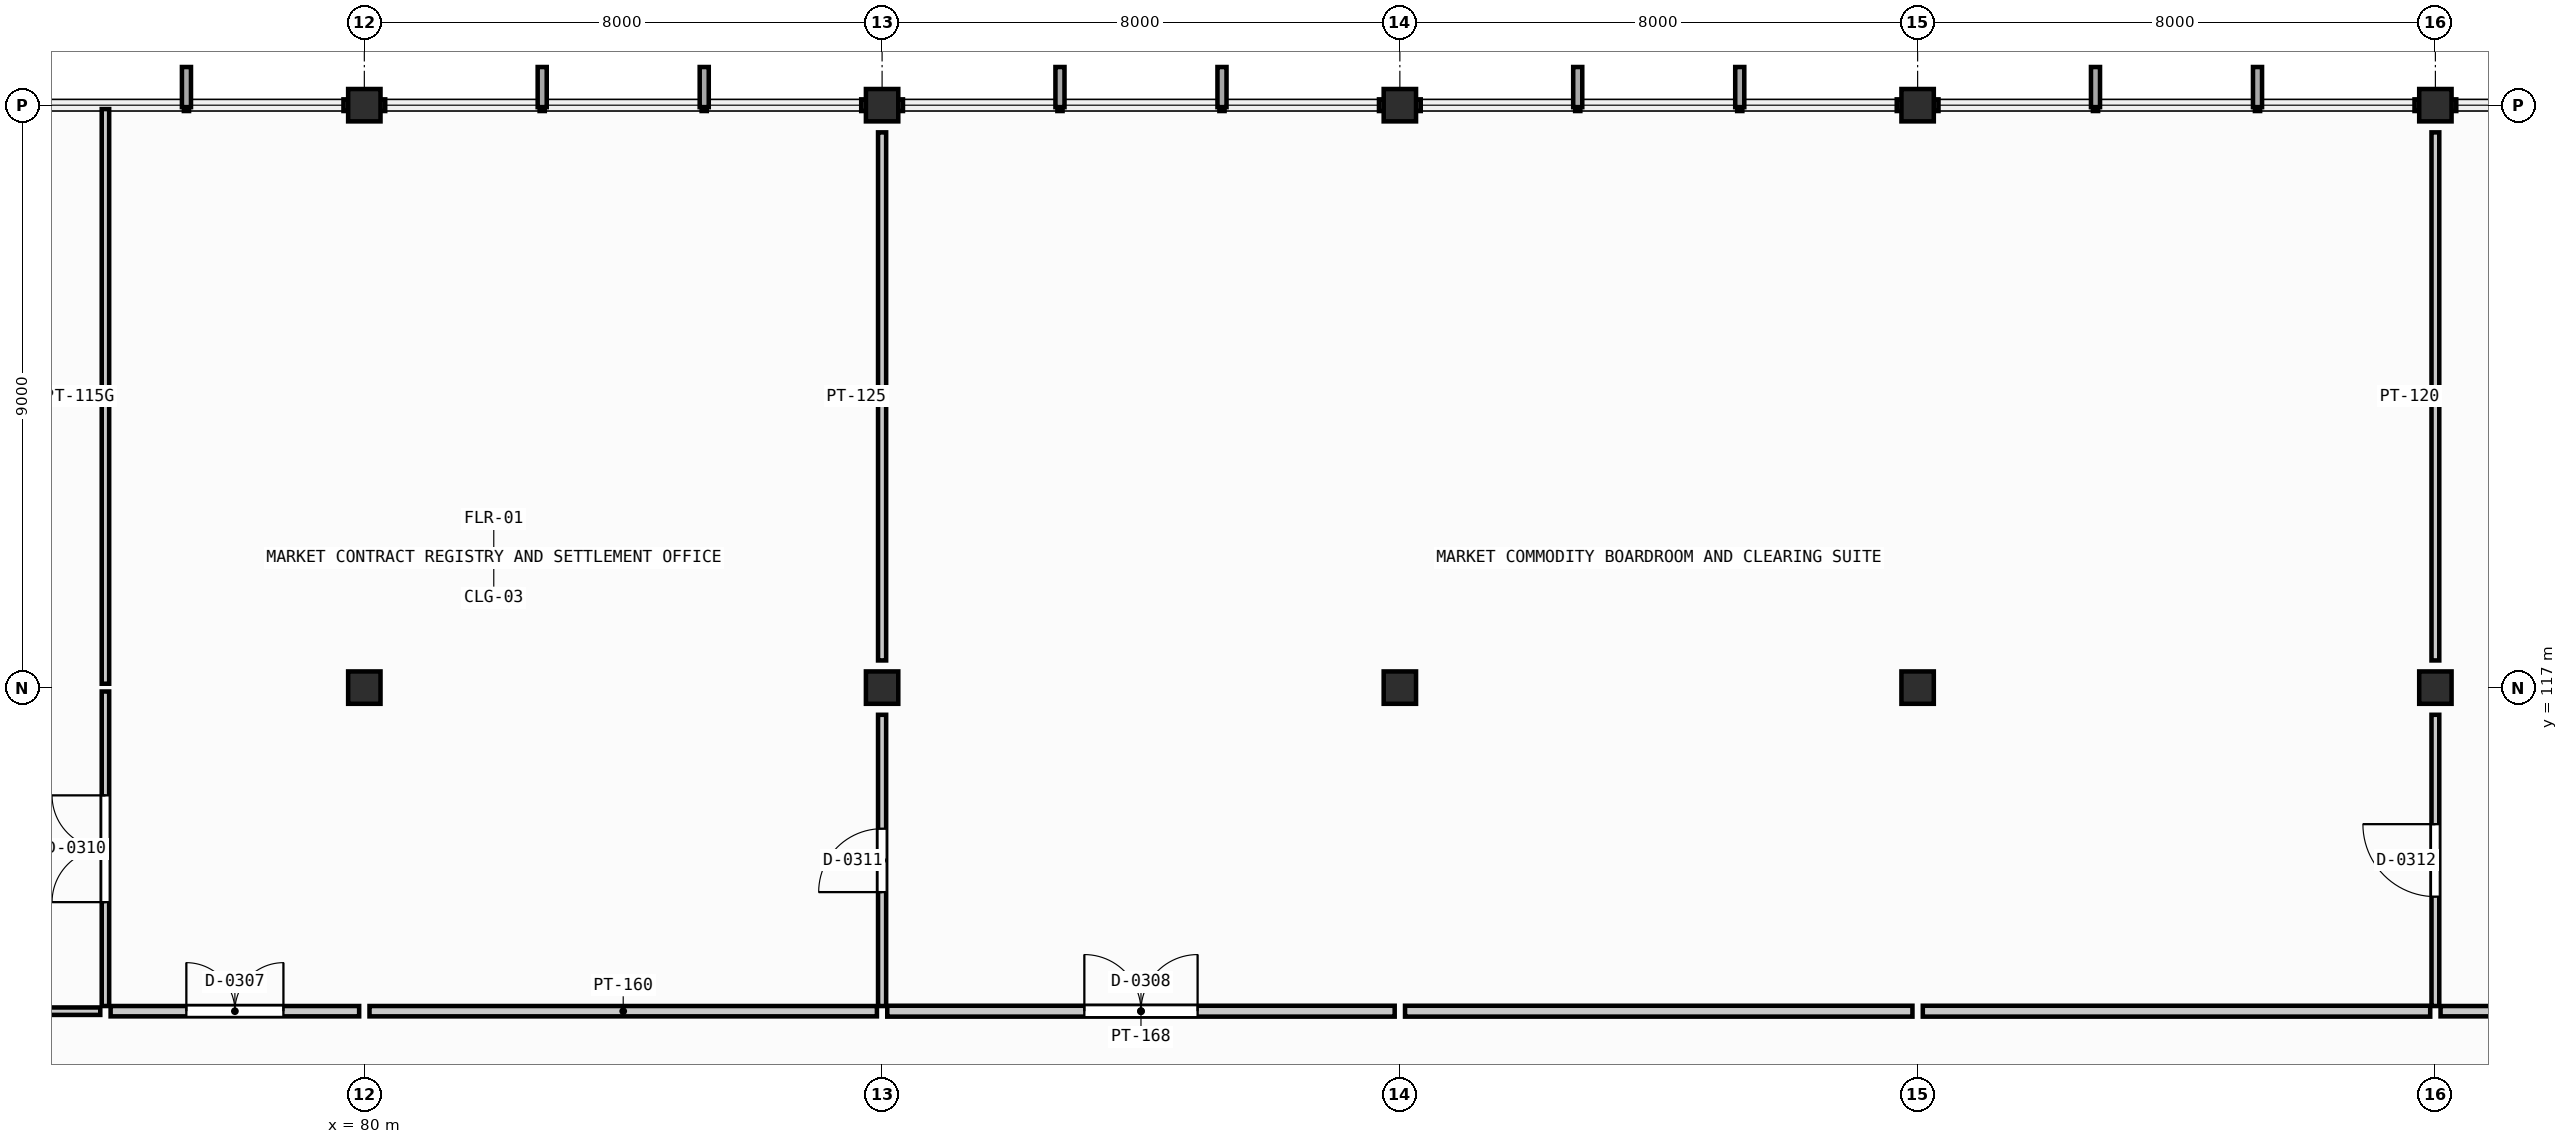
"""IFC4 building model, lengths in metres.
Left out: names, types, materials, properties, quantities, classifications, styles, units other than length and angle.
Written with IfcOpenShell. Run it as: python <this file> out.ifc"""

import sys

from ifc_helpers import new_model, si_unit, direction, frame, frame_2d, origin, origin_2d, place, context, subcontext, project, spatial, rectangle, extrude, element, fill, save


model = new_model("IFC4")
c1 = context("Model", 3, precision=1e-05, world=origin(), true_north=direction((0.0, 1.0)))
c2 = subcontext(c1, "Body", "Model", "MODEL_VIEW")
j1 = project(units=[si_unit("LENGTHUNIT", "METRE"), si_unit("PLANEANGLEUNIT", "RADIAN")], contexts=[c1])
p1 = place(None, origin())
s1 = spatial("IfcSite", under=j1, at=p1, CompositionType="ELEMENT")
p2 = place(p1, origin())
s2 = spatial("IfcBuilding", under=s1, at=p2, CompositionType="ELEMENT")
p3 = place(p2, frame((0.0, 0.0, 13.2)))
s3 = spatial("IfcBuildingStorey", under=s2, at=p3, CompositionType="ELEMENT", Elevation=13.2)
for number, where, z_axis, x_axis in (
    (1, (80.0, 117.0, 0.0), (0.0, 0.0, 1.0), (1.0, 0.0, 0.0)),
    (2, (80.0, 126.0, 0.0), (0.0, 0.0, 1.0), (1.0, 0.0, 0.0)),
    (3, (88.0, 117.0, 0.0), (0.0, 0.0, 1.0), (1.0, 0.0, 0.0)),
    (4, (88.0, 126.0, 0.0), (0.0, 0.0, 1.0), (1.0, 0.0, 0.0)),
    (5, (96.0, 117.0, 0.0), (0.0, 0.0, 1.0), (1.0, 0.0, 0.0)),
    (6, (96.0, 126.0, 0.0), (0.0, 0.0, 1.0), (1.0, 0.0, 0.0)),
    (7, (104.0, 117.0, 0.0), (0.0, 0.0, 1.0), (1.0, 0.0, 0.0)),
    (8, (104.0, 126.0, 0.0), (0.0, 0.0, 1.0), (1.0, 0.0, 0.0)),
    (9, (112.0, 117.0, 0.0), (0.0, 0.0, 1.0), (1.0, 0.0, 0.0)),
    (10, (112.0, 126.0, 0.0), (0.0, 0.0, 1.0), (1.0, 0.0, 0.0)),
):
    element("IfcColumn", number, at=place(p3, frame(where, z_axis=z_axis, x_axis=x_axis)), inside=s3, PredefinedType="COLUMN", context=c2, shape_type="SweptSolid", body=[
        extrude(rectangle(XDim=0.5, YDim=0.5, at=origin_2d()), origin(), (0.0, 0.0, 1.0), 3.9),
    ])
p4 = place(p3, frame((72.08, 112.0, 0.0), z_axis=(0.0, 0.0, 1.0), x_axis=(1.0, 0.0, 0.0)))
e11 = element("IfcWall", 11, at=p4, inside=s3, PredefinedType="PARTITIONING", context=c2, shape_type="SweptSolid", body=[
    extrude(rectangle(XDim=3.84, YDim=0.115, at=frame_2d((1.92, 0.0))), origin(), (0.0, 0.0, 1.0), 2.75),
])
p5 = place(p3, frame((76.08, 112.0, 0.0), z_axis=(0.0, 0.0, 1.0), x_axis=(1.0, 0.0, 0.0)))
e12 = element("IfcWall", 12, at=p5, inside=s3, PredefinedType="PARTITIONING", context=c2, shape_type="SweptSolid", body=[
    extrude(rectangle(XDim=3.84, YDim=0.16, at=frame_2d((1.92, 0.0))), origin(), (0.0, 0.0, 1.0), 2.75),
])
p6 = place(p5, frame((1.17, 0.0, 0.0)))
e13 = element("IfcOpeningElement", 13, at=p6, cuts=e12, PredefinedType="OPENING", context=c2, shape_type="SweptSolid", body=[
    extrude(rectangle(XDim=1.5, YDim=2.15, at=frame_2d((0.75, 1.075))), frame((0.0, 0.09, 0.0), z_axis=(0.0, -1.0, 0.0), x_axis=(1.0, 0.0, 0.0)), (0.0, 0.0, 1.0), 0.18),
])
p7 = place(p3, frame((80.08, 112.0, 0.0), z_axis=(0.0, 0.0, 1.0), x_axis=(1.0, 0.0, 0.0)))
e14 = element("IfcWall", 14, at=p7, inside=s3, PredefinedType="PARTITIONING", context=c2, shape_type="SweptSolid", body=[
    extrude(rectangle(XDim=7.84, YDim=0.16, at=frame_2d((3.92, 0.0))), origin(), (0.0, 0.0, 1.0), 2.75),
])
p8 = place(p3, frame((88.08, 112.0, 0.0), z_axis=(0.0, 0.0, 1.0), x_axis=(1.0, 0.0, 0.0)))
e15 = element("IfcWall", 15, at=p8, inside=s3, PredefinedType="PARTITIONING", context=c2, shape_type="SweptSolid", body=[
    extrude(rectangle(XDim=7.84, YDim=0.168, at=frame_2d((3.92, 0.0))), origin(), (0.0, 0.0, 1.0), 2.75),
])
p9 = place(p8, frame((3.045, 0.0, 0.0)))
e16 = element("IfcOpeningElement", 16, at=p9, cuts=e15, PredefinedType="OPENING", context=c2, shape_type="SweptSolid", body=[
    extrude(rectangle(XDim=1.75, YDim=2.22, at=frame_2d((0.875, 1.11))), frame((0.0, 0.094, 0.0), z_axis=(0.0, -1.0, 0.0), x_axis=(1.0, 0.0, 0.0)), (0.0, 0.0, 1.0), 0.188),
])
for number, where, z_axis, x_axis in (
    (17, (96.08, 112.0, 0.0), (0.0, 0.0, 1.0), (1.0, 0.0, 0.0)),
    (18, (104.08, 112.0, 0.0), (0.0, 0.0, 1.0), (1.0, 0.0, 0.0)),
):
    element("IfcWall", number, at=place(p3, frame(where, z_axis=z_axis, x_axis=x_axis)), inside=s3, PredefinedType="PARTITIONING", context=c2, shape_type="SweptSolid", body=[
        extrude(rectangle(XDim=7.84, YDim=0.168, at=frame_2d((3.92, 0.0))), origin(), (0.0, 0.0, 1.0), 2.75),
    ])
p10 = place(p3, frame((112.08, 112.0, 0.0), z_axis=(0.0, 0.0, 1.0), x_axis=(1.0, 0.0, 0.0)))
e19 = element("IfcWall", 19, at=p10, inside=s3, PredefinedType="PARTITIONING", context=c2, shape_type="SweptSolid", body=[
    extrude(rectangle(XDim=7.84, YDim=0.16, at=frame_2d((3.92, 0.0))), origin(), (0.0, 0.0, 1.0), 2.75),
])
p11 = place(p10, frame((3.395, 0.0, 0.0)))
e20 = element("IfcOpeningElement", 20, at=p11, cuts=e19, PredefinedType="OPENING", context=c2, shape_type="SweptSolid", body=[
    extrude(rectangle(XDim=1.05, YDim=2.15, at=frame_2d((0.525, 1.075))), frame((0.0, 0.09, 0.0), z_axis=(0.0, -1.0, 0.0), x_axis=(1.0, 0.0, 0.0)), (0.0, 0.0, 1.0), 0.18),
])
p12 = place(p3, frame((76.0, 112.08, 0.0), z_axis=(0.0, 0.0, 1.0), x_axis=(0.0, 1.0, 0.0)))
e21 = element("IfcWall", 21, at=p12, inside=s3, PredefinedType="PARTITIONING", context=c2, shape_type="SweptSolid", body=[
    extrude(rectangle(XDim=4.86, YDim=0.115, at=frame_2d((2.43, 0.0))), origin(), (0.0, 0.0, 1.0), 2.75),
])
p13 = place(p12, frame((1.605, 0.0, 0.0)))
e22 = element("IfcOpeningElement", 22, at=p13, cuts=e21, PredefinedType="OPENING", context=c2, shape_type="SweptSolid", body=[
    extrude(rectangle(XDim=1.65, YDim=2.25, at=frame_2d((0.825, 1.125))), frame((0.0, 0.067, 0.0), z_axis=(0.0, -1.0, 0.0), x_axis=(1.0, 0.0, 0.0)), (0.0, 0.0, 1.0), 0.135),
])
p14 = place(p3, frame((76.0, 117.06, 0.0), z_axis=(0.0, 0.0, 1.0), x_axis=(0.0, 1.0, 0.0)))
e23 = element("IfcWall", 23, at=p14, inside=s3, PredefinedType="PARTITIONING", context=c2, shape_type="SweptSolid", body=[
    extrude(rectangle(XDim=8.88, YDim=0.115, at=frame_2d((4.44, 0.0))), origin(), (0.0, 0.0, 1.0), 2.75),
])
p15 = place(p3, frame((88.0, 112.08, 0.0), z_axis=(0.0, 0.0, 1.0), x_axis=(0.0, 1.0, 0.0)))
e24 = element("IfcWall", 24, at=p15, inside=s3, PredefinedType="PARTITIONING", context=c2, shape_type="SweptSolid", body=[
    extrude(rectangle(XDim=4.5, YDim=0.125, at=frame_2d((2.25, 0.0))), origin(), (0.0, 0.0, 1.0), 2.75),
])
p16 = place(p15, frame((1.76, 0.0, 0.0)))
e25 = element("IfcOpeningElement", 25, at=p16, cuts=e24, PredefinedType="OPENING", context=c2, shape_type="SweptSolid", body=[
    extrude(rectangle(XDim=0.98, YDim=2.12, at=frame_2d((0.49, 1.06))), frame((0.0, 0.073, 0.0), z_axis=(0.0, -1.0, 0.0), x_axis=(1.0, 0.0, 0.0)), (0.0, 0.0, 1.0), 0.145),
])
p17 = place(p3, frame((88.0, 117.42, 0.0), z_axis=(0.0, 0.0, 1.0), x_axis=(0.0, 1.0, 0.0)))
e26 = element("IfcWall", 26, at=p17, inside=s3, PredefinedType="PARTITIONING", context=c2, shape_type="SweptSolid", body=[
    extrude(rectangle(XDim=8.16, YDim=0.125, at=frame_2d((4.08, 0.0))), origin(), (0.0, 0.0, 1.0), 2.75),
])
p18 = place(p3, frame((112.0, 112.08, 0.0), z_axis=(0.0, 0.0, 1.0), x_axis=(0.0, 1.0, 0.0)))
e27 = element("IfcWall", 27, at=p18, inside=s3, PredefinedType="PARTITIONING", context=c2, shape_type="SweptSolid", body=[
    extrude(rectangle(XDim=4.5, YDim=0.12, at=frame_2d((2.25, 0.0))), origin(), (0.0, 0.0, 1.0), 2.75),
])
p19 = place(p18, frame((1.69, 0.0, 0.0)))
e28 = element("IfcOpeningElement", 28, at=p19, cuts=e27, PredefinedType="OPENING", context=c2, shape_type="SweptSolid", body=[
    extrude(rectangle(XDim=1.12, YDim=2.18, at=frame_2d((0.56, 1.09))), frame((0.0, 0.07, 0.0), z_axis=(0.0, -1.0, 0.0), x_axis=(1.0, 0.0, 0.0)), (0.0, 0.0, 1.0), 0.14),
])
p20 = place(p3, frame((112.0, 117.42, 0.0), z_axis=(0.0, 0.0, 1.0), x_axis=(0.0, 1.0, 0.0)))
e29 = element("IfcWall", 29, at=p20, inside=s3, PredefinedType="PARTITIONING", context=c2, shape_type="SweptSolid", body=[
    extrude(rectangle(XDim=8.16, YDim=0.12, at=frame_2d((4.08, 0.0))), origin(), (0.0, 0.0, 1.0), 2.75),
])
p21 = place(p6, origin())
e30 = element("IfcDoor", 30, at=p21, inside=s3, OperationType="DOUBLE_DOOR_SINGLE_SWING", PredefinedType="DOOR", context=c2, shape_type="SweptSolid", body=[
    extrude(rectangle(XDim=1.5, YDim=2.15, at=frame_2d((0.75, 1.075))), frame((0.0, 0.025, 0.0), z_axis=(0.0, -1.0, 0.0), x_axis=(1.0, 0.0, 0.0)), (0.0, 0.0, 1.0), 0.05),
])
fill(e13, e30)
p22 = place(p9, origin())
e31 = element("IfcDoor", 31, at=p22, inside=s3, OperationType="DOUBLE_DOOR_SINGLE_SWING", PredefinedType="DOOR", context=c2, shape_type="SweptSolid", body=[
    extrude(rectangle(XDim=1.75, YDim=2.22, at=frame_2d((0.875, 1.11))), frame((0.0, 0.025, 0.0), z_axis=(0.0, -1.0, 0.0), x_axis=(1.0, 0.0, 0.0)), (0.0, 0.0, 1.0), 0.05),
])
fill(e16, e31)
p23 = place(p13, origin())
e32 = element("IfcDoor", 32, at=p23, inside=s3, OperationType="DOUBLE_DOOR_SINGLE_SWING", PredefinedType="DOOR", context=c2, shape_type="SweptSolid", body=[
    extrude(rectangle(XDim=1.65, YDim=2.25, at=frame_2d((0.825, 1.125))), frame((0.0, 0.025, 0.0), z_axis=(0.0, -1.0, 0.0), x_axis=(1.0, 0.0, 0.0)), (0.0, 0.0, 1.0), 0.05),
])
fill(e22, e32)
p24 = place(p16, origin())
e33 = element("IfcDoor", 33, at=p24, inside=s3, OperationType="SINGLE_SWING_LEFT", PredefinedType="DOOR", context=c2, shape_type="SweptSolid", body=[
    extrude(rectangle(XDim=0.98, YDim=2.12, at=frame_2d((0.49, 1.06))), frame((0.0, 0.025, 0.0), z_axis=(0.0, -1.0, 0.0), x_axis=(1.0, 0.0, 0.0)), (0.0, 0.0, 1.0), 0.05),
])
fill(e25, e33)
p25 = place(p19, origin())
e34 = element("IfcDoor", 34, at=p25, inside=s3, OperationType="SINGLE_SWING_RIGHT", PredefinedType="DOOR", context=c2, shape_type="SweptSolid", body=[
    extrude(rectangle(XDim=1.12, YDim=2.18, at=frame_2d((0.56, 1.09))), frame((0.0, 0.025, 0.0), z_axis=(0.0, -1.0, 0.0), x_axis=(1.0, 0.0, 0.0)), (0.0, 0.0, 1.0), 0.05),
])
fill(e28, e34)
save(model, sys.argv[1])
